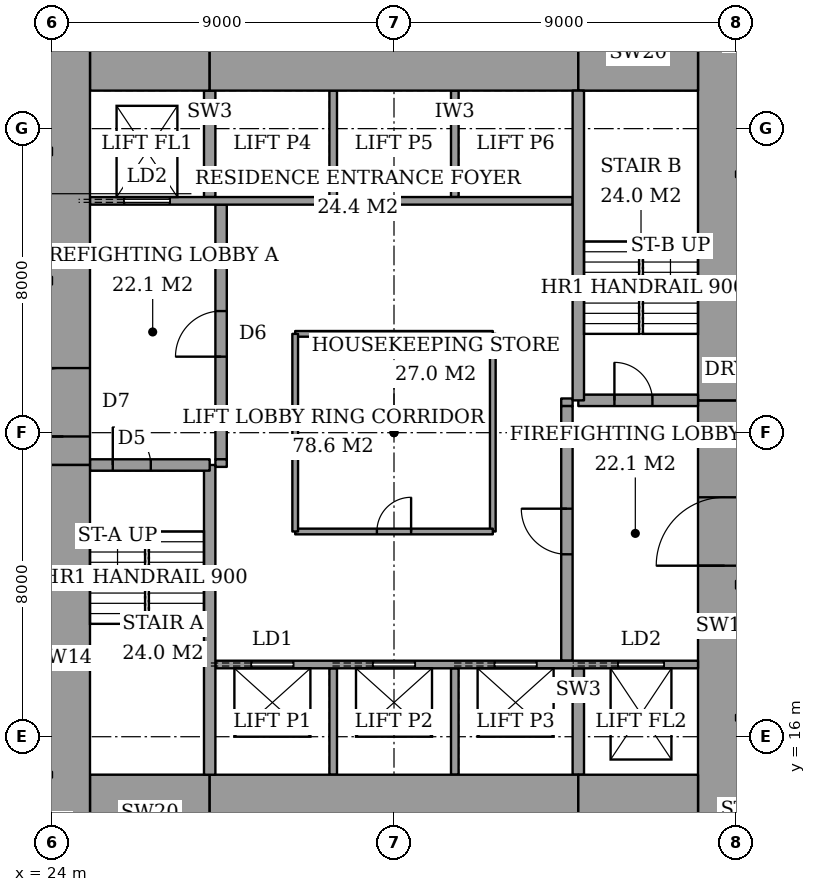
"""IFC4 building model, lengths in metres.
Left out: names, types, materials, properties, quantities, classifications, styles, units other than length and angle.
Written with IfcOpenShell. Run it as: python <this file> out.ifc"""

import sys

from ifc_helpers import new_model, si_unit, direction, frame, frame_2d, origin, place, context, subcontext, project, spatial, rectangle, extrude, element, fill, save


model = new_model("IFC4")
c1 = context("Model", 3, precision=1e-05, world=origin(), true_north=direction((0.0, 1.0)))
c2 = subcontext(c1, "Body", "Model", "MODEL_VIEW")
j1 = project(units=[si_unit("LENGTHUNIT", "METRE"), si_unit("PLANEANGLEUNIT", "RADIAN")], contexts=[c1])
p1 = place(None, origin())
s1 = spatial("IfcSite", under=j1, at=p1, CompositionType="ELEMENT")
p2 = place(p1, origin())
s2 = spatial("IfcBuilding", under=s1, at=p2, CompositionType="ELEMENT")
p3 = place(p2, frame((0.0, 0.0, 150.2)))
s3 = spatial("IfcBuildingStorey", under=s2, at=p3, CompositionType="ELEMENT", Elevation=150.2)
p4 = place(p3, frame((25.0, 14.0, 0.0), z_axis=(0.0, 0.0, 1.0), x_axis=(1.0, 0.0, 0.0)))
e1 = element("IfcWall", 1, at=p4, inside=s3, PredefinedType="SHEAR", context=c2, shape_type="SweptSolid", body=[
    extrude(rectangle(XDim=3.15, YDim=2.0, at=frame_2d((1.575, 0.0))), origin(), (0.0, 0.0, 1.0), 3.6),
])
p5 = place(p3, frame((28.15, 14.0, 0.0), z_axis=(0.0, 0.0, 1.0), x_axis=(1.0, 0.0, 0.0)))
e2 = element("IfcWall", 2, at=p5, inside=s3, PredefinedType="SHEAR", context=c2, shape_type="SweptSolid", body=[
    extrude(rectangle(XDim=9.7, YDim=2.0, at=frame_2d((4.85, 0.0))), origin(), (0.0, 0.0, 1.0), 3.6),
])
for number, where, z_axis, x_axis in (
    (3, (37.85, 14.0, 0.0), (0.0, 0.0, 1.0), (1.0, 0.0, 0.0)),
    (4, (25.0, 34.0, 0.0), (0.0, 0.0, 1.0), (1.0, 0.0, 0.0)),
):
    element("IfcWall", number, at=place(p3, frame(where, z_axis=z_axis, x_axis=x_axis)), inside=s3, PredefinedType="SHEAR", context=c2, shape_type="SweptSolid", body=[
        extrude(rectangle(XDim=3.15, YDim=2.0, at=frame_2d((1.575, 0.0))), origin(), (0.0, 0.0, 1.0), 3.6),
    ])
p6 = place(p3, frame((28.15, 34.0, 0.0), z_axis=(0.0, 0.0, 1.0), x_axis=(1.0, 0.0, 0.0)))
e5 = element("IfcWall", 5, at=p6, inside=s3, PredefinedType="SHEAR", context=c2, shape_type="SweptSolid", body=[
    extrude(rectangle(XDim=9.7, YDim=2.0, at=frame_2d((4.85, 0.0))), origin(), (0.0, 0.0, 1.0), 3.6),
])
p7 = place(p3, frame((37.85, 34.0, 0.0), z_axis=(0.0, 0.0, 1.0), x_axis=(1.0, 0.0, 0.0)))
e6 = element("IfcWall", 6, at=p7, inside=s3, PredefinedType="SHEAR", context=c2, shape_type="SweptSolid", body=[
    extrude(rectangle(XDim=3.15, YDim=2.0, at=frame_2d((1.575, 0.0))), origin(), (0.0, 0.0, 1.0), 3.6),
])
p8 = place(p3, frame((24.3, 13.0, 0.0), z_axis=(0.0, 0.0, 1.0), x_axis=(0.0, 1.0, 0.0)))
e7 = element("IfcWall", 7, at=p8, inside=s3, PredefinedType="SHEAR", context=c2, shape_type="SweptSolid", body=[
    extrude(rectangle(XDim=10.15, YDim=1.4, at=frame_2d((5.075, 0.0))), origin(), (0.0, 0.0, 1.0), 3.6),
])
p9 = place(p3, frame((24.3, 23.15, 0.0), z_axis=(0.0, 0.0, 1.0), x_axis=(0.0, 1.0, 0.0)))
e8 = element("IfcWall", 8, at=p9, inside=s3, PredefinedType="SHEAR", context=c2, shape_type="SweptSolid", body=[
    extrude(rectangle(XDim=11.85, YDim=1.4, at=frame_2d((5.925, 0.0))), origin(), (0.0, 0.0, 1.0), 3.6),
])
p10 = place(p9, frame((0.75, 0.0, 0.0)))
e9 = element("IfcOpeningElement", 9, at=p10, cuts=e8, PredefinedType="OPENING", context=c2, shape_type="SweptSolid", body=[
    extrude(rectangle(XDim=1.8, YDim=2.4, at=frame_2d((0.9, 1.2))), frame((0.0, 0.71, 0.0), z_axis=(0.0, -1.0, 0.0), x_axis=(1.0, 0.0, 0.0)), (0.0, 0.0, 1.0), 1.42),
])
p11 = place(p3, frame((41.7, 13.0, 0.0), z_axis=(0.0, 0.0, 1.0), x_axis=(0.0, 1.0, 0.0)))
e10 = element("IfcWall", 10, at=p11, inside=s3, PredefinedType="SHEAR", context=c2, shape_type="SweptSolid", body=[
    extrude(rectangle(XDim=11.85, YDim=1.4, at=frame_2d((5.925, 0.0))), origin(), (0.0, 0.0, 1.0), 3.6),
])
p12 = place(p11, frame((7.5, 0.0, 0.0)))
e11 = element("IfcOpeningElement", 11, at=p12, cuts=e10, PredefinedType="OPENING", context=c2, shape_type="SweptSolid", body=[
    extrude(rectangle(XDim=1.8, YDim=2.4, at=frame_2d((0.9, 1.2))), frame((0.0, 0.71, 0.0), z_axis=(0.0, -1.0, 0.0), x_axis=(1.0, 0.0, 0.0)), (0.0, 0.0, 1.0), 1.42),
])
p13 = place(p3, frame((41.7, 24.85, 0.0), z_axis=(0.0, 0.0, 1.0), x_axis=(0.0, 1.0, 0.0)))
e12 = element("IfcWall", 12, at=p13, inside=s3, PredefinedType="SHEAR", context=c2, shape_type="SweptSolid", body=[
    extrude(rectangle(XDim=10.15, YDim=1.4, at=frame_2d((5.075, 0.0))), origin(), (0.0, 0.0, 1.0), 3.6),
])
p14 = place(p3, frame((28.15, 15.0, 0.0), z_axis=(0.0, 0.0, 1.0), x_axis=(0.0, 1.0, 0.0)))
e13 = element("IfcWall", 13, at=p14, inside=s3, PredefinedType="SHEAR", context=c2, shape_type="SweptSolid", body=[
    extrude(rectangle(XDim=8.15, YDim=0.3, at=frame_2d((4.075, 0.0))), origin(), (0.0, 0.0, 1.0), 3.6),
])
p15 = place(p3, frame((25.0, 23.15, 0.0), z_axis=(0.0, 0.0, 1.0), x_axis=(1.0, 0.0, 0.0)))
e14 = element("IfcWall", 14, at=p15, inside=s3, PredefinedType="SHEAR", context=c2, shape_type="SweptSolid", body=[
    extrude(rectangle(XDim=3.15, YDim=0.3, at=frame_2d((1.575, 0.0))), origin(), (0.0, 0.0, 1.0), 3.6),
])
p16 = place(p15, frame((0.6, 0.0, 0.0)))
e15 = element("IfcOpeningElement", 15, at=p16, cuts=e14, PredefinedType="OPENING", context=c2, shape_type="SweptSolid", body=[
    extrude(rectangle(XDim=1.0, YDim=2.1, at=frame_2d((0.5, 1.05))), frame((0.0, 0.16, 0.0), z_axis=(0.0, -1.0, 0.0), x_axis=(1.0, 0.0, 0.0)), (0.0, 0.0, 1.0), 0.32),
])
p17 = place(p3, frame((37.85, 24.85, 0.0), z_axis=(0.0, 0.0, 1.0), x_axis=(0.0, 1.0, 0.0)))
e16 = element("IfcWall", 16, at=p17, inside=s3, PredefinedType="SHEAR", context=c2, shape_type="SweptSolid", body=[
    extrude(rectangle(XDim=8.15, YDim=0.3, at=frame_2d((4.075, 0.0))), origin(), (0.0, 0.0, 1.0), 3.6),
])
p18 = place(p3, frame((37.85, 24.85, 0.0), z_axis=(0.0, 0.0, 1.0), x_axis=(1.0, 0.0, 0.0)))
e17 = element("IfcWall", 17, at=p18, inside=s3, PredefinedType="SHEAR", context=c2, shape_type="SweptSolid", body=[
    extrude(rectangle(XDim=3.15, YDim=0.3, at=frame_2d((1.575, 0.0))), origin(), (0.0, 0.0, 1.0), 3.6),
])
p19 = place(p18, frame((0.95, 0.0, 0.0)))
e18 = element("IfcOpeningElement", 18, at=p19, cuts=e17, PredefinedType="OPENING", context=c2, shape_type="SweptSolid", body=[
    extrude(rectangle(XDim=1.0, YDim=2.1, at=frame_2d((0.5, 1.05))), frame((0.0, 0.16, 0.0), z_axis=(0.0, -1.0, 0.0), x_axis=(1.0, 0.0, 0.0)), (0.0, 0.0, 1.0), 0.32),
])
p20 = place(p3, frame((28.45, 23.3, 0.0), z_axis=(0.0, 0.0, 1.0), x_axis=(0.0, 1.0, 0.0)))
e19 = element("IfcWall", 19, at=p20, inside=s3, PredefinedType="PARTITIONING", context=c2, shape_type="SweptSolid", body=[
    extrude(rectangle(XDim=6.7, YDim=0.3, at=frame_2d((3.35, 0.0))), origin(), (0.0, 0.0, 1.0), 3.6),
])
p21 = place(p20, frame((2.7, 0.0, 0.0)))
e20 = element("IfcOpeningElement", 20, at=p21, cuts=e19, PredefinedType="OPENING", context=c2, shape_type="SweptSolid", body=[
    extrude(rectangle(XDim=1.2, YDim=2.1, at=frame_2d((0.6, 1.05))), frame((0.0, 0.16, 0.0), z_axis=(0.0, -1.0, 0.0), x_axis=(1.0, 0.0, 0.0)), (0.0, 0.0, 1.0), 0.32),
])
p22 = place(p3, frame((37.55, 18.0, 0.0), z_axis=(0.0, 0.0, 1.0), x_axis=(0.0, 1.0, 0.0)))
e21 = element("IfcWall", 21, at=p22, inside=s3, PredefinedType="PARTITIONING", context=c2, shape_type="SweptSolid", body=[
    extrude(rectangle(XDim=6.7, YDim=0.3, at=frame_2d((3.35, 0.0))), origin(), (0.0, 0.0, 1.0), 3.6),
])
p23 = place(p22, frame((2.8, 0.0, 0.0)))
e22 = element("IfcOpeningElement", 22, at=p23, cuts=e21, PredefinedType="OPENING", context=c2, shape_type="SweptSolid", body=[
    extrude(rectangle(XDim=1.2, YDim=2.1, at=frame_2d((0.6, 1.05))), frame((0.0, 0.16, 0.0), z_axis=(0.0, -1.0, 0.0), x_axis=(1.0, 0.0, 0.0)), (0.0, 0.0, 1.0), 0.32),
])
p24 = place(p3, frame((28.3, 17.9, 0.0), z_axis=(0.0, 0.0, 1.0), x_axis=(1.0, 0.0, 0.0)))
e23 = element("IfcWall", 23, at=p24, inside=s3, PredefinedType="PARTITIONING", context=c2, shape_type="SweptSolid", body=[
    extrude(rectangle(XDim=12.7, YDim=0.2, at=frame_2d((6.35, 0.0))), origin(), (0.0, 0.0, 1.0), 3.6),
])
p25 = place(p24, frame((0.95, 0.0, 0.0)))
e24 = element("IfcOpeningElement", 24, at=p25, cuts=e23, PredefinedType="OPENING", context=c2, shape_type="SweptSolid", body=[
    extrude(rectangle(XDim=1.1, YDim=2.1, at=frame_2d((0.55, 1.05))), frame((0.0, 0.11, 0.0), z_axis=(0.0, -1.0, 0.0), x_axis=(1.0, 0.0, 0.0)), (0.0, 0.0, 1.0), 0.22),
])
p26 = place(p24, frame((4.15, 0.0, 0.0)))
e25 = element("IfcOpeningElement", 25, at=p26, cuts=e23, PredefinedType="OPENING", context=c2, shape_type="SweptSolid", body=[
    extrude(rectangle(XDim=1.1, YDim=2.1, at=frame_2d((0.55, 1.05))), frame((0.0, 0.11, 0.0), z_axis=(0.0, -1.0, 0.0), x_axis=(1.0, 0.0, 0.0)), (0.0, 0.0, 1.0), 0.22),
])
p27 = place(p24, frame((7.35, 0.0, 0.0)))
e26 = element("IfcOpeningElement", 26, at=p27, cuts=e23, PredefinedType="OPENING", context=c2, shape_type="SweptSolid", body=[
    extrude(rectangle(XDim=1.1, YDim=2.1, at=frame_2d((0.55, 1.05))), frame((0.0, 0.11, 0.0), z_axis=(0.0, -1.0, 0.0), x_axis=(1.0, 0.0, 0.0)), (0.0, 0.0, 1.0), 0.22),
])
p28 = place(p24, frame((10.6, 0.0, 0.0)))
e27 = element("IfcOpeningElement", 27, at=p28, cuts=e23, PredefinedType="OPENING", context=c2, shape_type="SweptSolid", body=[
    extrude(rectangle(XDim=1.2, YDim=2.1, at=frame_2d((0.6, 1.05))), frame((0.0, 0.11, 0.0), z_axis=(0.0, -1.0, 0.0), x_axis=(1.0, 0.0, 0.0)), (0.0, 0.0, 1.0), 0.22),
])
p29 = place(p3, frame((25.0, 30.1, 0.0), z_axis=(0.0, 0.0, 1.0), x_axis=(1.0, 0.0, 0.0)))
e28 = element("IfcWall", 28, at=p29, inside=s3, PredefinedType="PARTITIONING", context=c2, shape_type="SweptSolid", body=[
    extrude(rectangle(XDim=12.7, YDim=0.2, at=frame_2d((6.35, 0.0))), origin(), (0.0, 0.0, 1.0), 3.6),
])
p30 = place(p29, frame((0.9, 0.0, 0.0)))
e29 = element("IfcOpeningElement", 29, at=p30, cuts=e28, PredefinedType="OPENING", context=c2, shape_type="SweptSolid", body=[
    extrude(rectangle(XDim=1.2, YDim=2.1, at=frame_2d((0.6, 1.05))), frame((0.0, 0.11, 0.0), z_axis=(0.0, -1.0, 0.0), x_axis=(1.0, 0.0, 0.0)), (0.0, 0.0, 1.0), 0.22),
])
for number, where, z_axis, x_axis in (
    (30, (31.4, 15.0, 0.0), (0.0, 0.0, 1.0), (0.0, 1.0, 0.0)),
    (31, (34.6, 15.0, 0.0), (0.0, 0.0, 1.0), (0.0, 1.0, 0.0)),
):
    element("IfcWall", number, at=place(p3, frame(where, z_axis=z_axis, x_axis=x_axis)), inside=s3, PredefinedType="PARTITIONING", context=c2, shape_type="SweptSolid", body=[
        extrude(rectangle(XDim=2.8, YDim=0.2, at=frame_2d((1.4, 0.0))), origin(), (0.0, 0.0, 1.0), 3.6),
    ])
p31 = place(p3, frame((37.85, 15.0, 0.0), z_axis=(0.0, 0.0, 1.0), x_axis=(0.0, 1.0, 0.0)))
e32 = element("IfcWall", 32, at=p31, inside=s3, PredefinedType="SHEAR", context=c2, shape_type="SweptSolid", body=[
    extrude(rectangle(XDim=2.8, YDim=0.3, at=frame_2d((1.4, 0.0))), origin(), (0.0, 0.0, 1.0), 3.6),
])
for number, where, z_axis, x_axis in (
    (33, (31.4, 30.2, 0.0), (0.0, 0.0, 1.0), (0.0, 1.0, 0.0)),
    (34, (34.6, 30.2, 0.0), (0.0, 0.0, 1.0), (0.0, 1.0, 0.0)),
):
    element("IfcWall", number, at=place(p3, frame(where, z_axis=z_axis, x_axis=x_axis)), inside=s3, PredefinedType="PARTITIONING", context=c2, shape_type="SweptSolid", body=[
        extrude(rectangle(XDim=2.8, YDim=0.2, at=frame_2d((1.4, 0.0))), origin(), (0.0, 0.0, 1.0), 3.6),
    ])
p32 = place(p3, frame((28.15, 30.2, 0.0), z_axis=(0.0, 0.0, 1.0), x_axis=(0.0, 1.0, 0.0)))
e35 = element("IfcWall", 35, at=p32, inside=s3, PredefinedType="SHEAR", context=c2, shape_type="SweptSolid", body=[
    extrude(rectangle(XDim=2.8, YDim=0.3, at=frame_2d((1.4, 0.0))), origin(), (0.0, 0.0, 1.0), 3.6),
])
for number, where, z_axis, x_axis in (
    (36, (28.3, 23.2, 0.0), (0.0, 0.0, 1.0), (1.0, 0.0, 0.0)),
    (37, (37.4, 24.8, 0.0), (0.0, 0.0, 1.0), (1.0, 0.0, 0.0)),
):
    element("IfcWall", number, at=place(p3, frame(where, z_axis=z_axis, x_axis=x_axis)), inside=s3, PredefinedType="PARTITIONING", context=c2, shape_type="SweptSolid", body=[
        extrude(rectangle(XDim=0.3, YDim=0.2, at=frame_2d((0.15, 0.0))), origin(), (0.0, 0.0, 1.0), 3.6),
    ])
p33 = place(p3, frame((30.4, 21.4, 0.0), z_axis=(0.0, 0.0, 1.0), x_axis=(1.0, 0.0, 0.0)))
e38 = element("IfcWall", 38, at=p33, inside=s3, PredefinedType="PARTITIONING", context=c2, shape_type="SweptSolid", body=[
    extrude(rectangle(XDim=5.2, YDim=0.15, at=frame_2d((2.6, 0.0))), origin(), (0.0, 0.0, 1.0), 3.35),
])
p34 = place(p33, frame((2.15, 0.0, 0.0)))
e39 = element("IfcOpeningElement", 39, at=p34, cuts=e38, PredefinedType="OPENING", context=c2, shape_type="SweptSolid", body=[
    extrude(rectangle(XDim=0.9, YDim=2.1, at=frame_2d((0.45, 1.05))), frame((0.0, 0.085, 0.0), z_axis=(0.0, -1.0, 0.0), x_axis=(1.0, 0.0, 0.0)), (0.0, 0.0, 1.0), 0.17),
])
for number, where, z_axis, x_axis in (
    (40, (30.4, 26.6, 0.0), (0.0, 0.0, 1.0), (1.0, 0.0, 0.0)),
    (41, (30.4, 21.4, 0.0), (0.0, 0.0, 1.0), (0.0, 1.0, 0.0)),
    (42, (35.6, 21.4, 0.0), (0.0, 0.0, 1.0), (0.0, 1.0, 0.0)),
):
    element("IfcWall", number, at=place(p3, frame(where, z_axis=z_axis, x_axis=x_axis)), inside=s3, PredefinedType="PARTITIONING", context=c2, shape_type="SweptSolid", body=[
        extrude(rectangle(XDim=5.2, YDim=0.15, at=frame_2d((2.6, 0.0))), origin(), (0.0, 0.0, 1.0), 3.35),
    ])
p35 = place(p16, origin())
e43 = element("IfcDoor", 43, at=p35, inside=s3, OperationType="SINGLE_SWING_RIGHT", PredefinedType="DOOR", context=c2, shape_type="SweptSolid", body=[
    extrude(rectangle(XDim=1.0, YDim=2.1, at=frame_2d((0.5, 1.05))), frame((0.0, 0.025, 0.0), z_axis=(0.0, -1.0, 0.0), x_axis=(1.0, 0.0, 0.0)), (0.0, 0.0, 1.0), 0.05),
])
fill(e15, e43)
p36 = place(p19, origin())
e44 = element("IfcDoor", 44, at=p36, inside=s3, OperationType="SINGLE_SWING_RIGHT", PredefinedType="DOOR", context=c2, shape_type="SweptSolid", body=[
    extrude(rectangle(XDim=1.0, YDim=2.1, at=frame_2d((0.5, 1.05))), frame((0.0, 0.025, 0.0), z_axis=(0.0, -1.0, 0.0), x_axis=(1.0, 0.0, 0.0)), (0.0, 0.0, 1.0), 0.05),
])
fill(e18, e44)
p37 = place(p21, origin())
e45 = element("IfcDoor", 45, at=p37, inside=s3, OperationType="SINGLE_SWING_RIGHT", PredefinedType="DOOR", context=c2, shape_type="SweptSolid", body=[
    extrude(rectangle(XDim=1.2, YDim=2.1, at=frame_2d((0.6, 1.05))), frame((0.0, 0.025, 0.0), z_axis=(0.0, -1.0, 0.0), x_axis=(1.0, 0.0, 0.0)), (0.0, 0.0, 1.0), 0.05),
])
fill(e20, e45)
p38 = place(p23, origin())
e46 = element("IfcDoor", 46, at=p38, inside=s3, OperationType="SINGLE_SWING_LEFT", PredefinedType="DOOR", context=c2, shape_type="SweptSolid", body=[
    extrude(rectangle(XDim=1.2, YDim=2.1, at=frame_2d((0.6, 1.05))), frame((0.0, 0.025, 0.0), z_axis=(0.0, -1.0, 0.0), x_axis=(1.0, 0.0, 0.0)), (0.0, 0.0, 1.0), 0.05),
])
fill(e22, e46)
p39 = place(p10, origin())
e47 = element("IfcDoor", 47, at=p39, inside=s3, OperationType="DOUBLE_DOOR_DOUBLE_SWING", PredefinedType="DOOR", context=c2, shape_type="SweptSolid", body=[
    extrude(rectangle(XDim=1.8, YDim=2.4, at=frame_2d((0.9, 1.2))), frame((0.0, 0.025, 0.0), z_axis=(0.0, -1.0, 0.0), x_axis=(1.0, 0.0, 0.0)), (0.0, 0.0, 1.0), 0.05),
])
fill(e9, e47)
p40 = place(p12, origin())
e48 = element("IfcDoor", 48, at=p40, inside=s3, OperationType="DOUBLE_DOOR_DOUBLE_SWING", PredefinedType="DOOR", context=c2, shape_type="SweptSolid", body=[
    extrude(rectangle(XDim=1.8, YDim=2.4, at=frame_2d((0.9, 1.2))), frame((0.0, 0.025, 0.0), z_axis=(0.0, -1.0, 0.0), x_axis=(1.0, 0.0, 0.0)), (0.0, 0.0, 1.0), 0.05),
])
fill(e11, e48)
p41 = place(p34, origin())
e49 = element("IfcDoor", 49, at=p41, inside=s3, OperationType="SINGLE_SWING_LEFT", PredefinedType="DOOR", context=c2, shape_type="SweptSolid", body=[
    extrude(rectangle(XDim=0.9, YDim=2.1, at=frame_2d((0.45, 1.05))), frame((0.0, 0.025, 0.0), z_axis=(0.0, -1.0, 0.0), x_axis=(1.0, 0.0, 0.0)), (0.0, 0.0, 1.0), 0.05),
])
fill(e39, e49)
p42 = place(p25, origin())
e50 = element("IfcDoor", 50, at=p42, inside=s3, OperationType="SLIDING_TO_LEFT", PredefinedType="DOOR", context=c2, shape_type="SweptSolid", body=[
    extrude(rectangle(XDim=1.1, YDim=2.1, at=frame_2d((0.55, 1.05))), frame((0.0, 0.025, 0.0), z_axis=(0.0, -1.0, 0.0), x_axis=(1.0, 0.0, 0.0)), (0.0, 0.0, 1.0), 0.05),
])
fill(e24, e50)
p43 = place(p26, origin())
e51 = element("IfcDoor", 51, at=p43, inside=s3, OperationType="SLIDING_TO_LEFT", PredefinedType="DOOR", context=c2, shape_type="SweptSolid", body=[
    extrude(rectangle(XDim=1.1, YDim=2.1, at=frame_2d((0.55, 1.05))), frame((0.0, 0.025, 0.0), z_axis=(0.0, -1.0, 0.0), x_axis=(1.0, 0.0, 0.0)), (0.0, 0.0, 1.0), 0.05),
])
fill(e25, e51)
p44 = place(p27, origin())
e52 = element("IfcDoor", 52, at=p44, inside=s3, OperationType="SLIDING_TO_LEFT", PredefinedType="DOOR", context=c2, shape_type="SweptSolid", body=[
    extrude(rectangle(XDim=1.1, YDim=2.1, at=frame_2d((0.55, 1.05))), frame((0.0, 0.025, 0.0), z_axis=(0.0, -1.0, 0.0), x_axis=(1.0, 0.0, 0.0)), (0.0, 0.0, 1.0), 0.05),
])
fill(e26, e52)
p45 = place(p30, origin())
e53 = element("IfcDoor", 53, at=p45, inside=s3, OperationType="SLIDING_TO_LEFT", PredefinedType="DOOR", context=c2, shape_type="SweptSolid", body=[
    extrude(rectangle(XDim=1.2, YDim=2.1, at=frame_2d((0.6, 1.05))), frame((0.0, 0.025, 0.0), z_axis=(0.0, -1.0, 0.0), x_axis=(1.0, 0.0, 0.0)), (0.0, 0.0, 1.0), 0.05),
])
fill(e29, e53)
p46 = place(p28, origin())
e54 = element("IfcDoor", 54, at=p46, inside=s3, OperationType="SLIDING_TO_LEFT", PredefinedType="DOOR", context=c2, shape_type="SweptSolid", body=[
    extrude(rectangle(XDim=1.2, YDim=2.1, at=frame_2d((0.6, 1.05))), frame((0.0, 0.025, 0.0), z_axis=(0.0, -1.0, 0.0), x_axis=(1.0, 0.0, 0.0)), (0.0, 0.0, 1.0), 0.05),
])
fill(e27, e54)
save(model, sys.argv[1])
